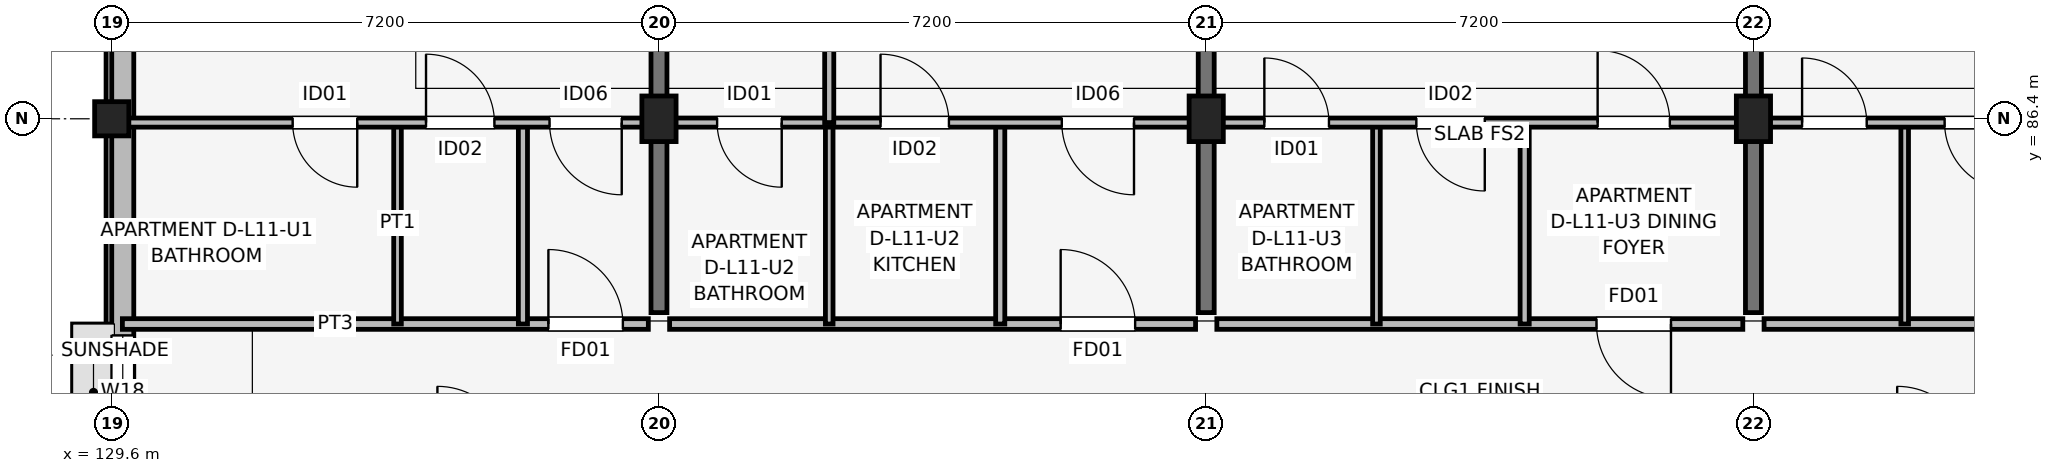
"""IFC4 building model, lengths in metres.
Left out: names, types, materials, properties, quantities, classifications, styles, units other than length and angle.
Written with IfcOpenShell. Run it as: python <this file> out.ifc"""

import sys

from ifc_helpers import new_model, si_unit, direction, frame, frame_2d, origin, origin_2d, place, context, subcontext, project, spatial, rectangle, extrude, element, fill, save


model = new_model("IFC4")
c1 = context("Model", 3, precision=1e-05, world=origin(), true_north=direction((0.0, 1.0)))
c2 = subcontext(c1, "Body", "Model", "MODEL_VIEW")
j1 = project(units=[si_unit("LENGTHUNIT", "METRE"), si_unit("PLANEANGLEUNIT", "RADIAN")], contexts=[c1])
p1 = place(None, origin())
s1 = spatial("IfcSite", under=j1, at=p1, CompositionType="ELEMENT")
p2 = place(p1, origin())
s2 = spatial("IfcBuilding", under=s1, at=p2, CompositionType="ELEMENT")
p3 = place(p2, frame((0.0, 0.0, 37.05)))
s3 = spatial("IfcBuildingStorey", under=s2, at=p3, CompositionType="ELEMENT", Elevation=37.05)
p4 = place(p3, frame((129.6, 86.4, 0.0), z_axis=(0.0, 0.0, 1.0), x_axis=(1.0, 0.0, 0.0)))
e1 = element("IfcColumn", 1, at=p4, inside=s3, PredefinedType="COLUMN", context=c2, shape_type="SweptSolid", body=[
    extrude(rectangle(XDim=0.45, YDim=0.45, at=origin_2d()), origin(), (0.0, 0.0, 1.0), 3.15),
])
for number, where, z_axis, x_axis in (
    (2, (136.8, 86.4, 0.0), (0.0, 0.0, 1.0), (1.0, 0.0, 0.0)),
    (3, (144.0, 86.4, 0.0), (0.0, 0.0, 1.0), (1.0, 0.0, 0.0)),
    (4, (151.2, 86.4, 0.0), (0.0, 0.0, 1.0), (1.0, 0.0, 0.0)),
):
    element("IfcColumn", number, at=place(p3, frame(where, z_axis=z_axis, x_axis=x_axis)), inside=s3, PredefinedType="COLUMN", context=c2, shape_type="SweptSolid", body=[
        extrude(rectangle(XDim=0.45, YDim=0.6, at=origin_2d()), origin(), (0.0, 0.0, 1.0), 3.15),
    ])
for number, where, z_axis, x_axis in (
    (5, (136.8, 83.85, 0.0), (0.0, 0.0, 1.0), (0.0, 1.0, 0.0)),
    (6, (144.0, 83.85, 0.0), (0.0, 0.0, 1.0), (0.0, 1.0, 0.0)),
    (7, (151.2, 83.85, 0.0), (0.0, 0.0, 1.0), (0.0, 1.0, 0.0)),
):
    element("IfcWall", number, at=place(p3, frame(where, z_axis=z_axis, x_axis=x_axis)), inside=s3, PredefinedType="SHEAR", context=c2, shape_type="SweptSolid", body=[
        extrude(rectangle(XDim=9.4, YDim=0.21, at=frame_2d((4.7, 0.0))), origin(), (0.0, 0.0, 1.0), 3.15),
    ])
p5 = place(p3, frame((129.745, 90.8, 0.0), z_axis=(0.0, 0.0, 1.0), x_axis=(0.0, -1.0, 0.0)))
e8 = element("IfcWall", 8, at=p5, inside=s3, PredefinedType="SOLIDWALL", context=c2, shape_type="SweptSolid", body=[
    extrude(rectangle(XDim=16.0, YDim=0.29, at=frame_2d((8.0, 0.0))), origin(), (0.0, 0.0, 1.0), 2.48),
])
p6 = place(p5, frame((7.25, 0.0, 1.05)))
e9 = element("IfcOpeningElement", 9, at=p6, cuts=e8, PredefinedType="OPENING", context=c2, shape_type="SweptSolid", body=[
    extrude(rectangle(XDim=1.5, YDim=1.15, at=frame_2d((0.75, 0.575))), frame((0.0, 0.155, 0.0), z_axis=(0.0, -1.0, 0.0), x_axis=(1.0, 0.0, 0.0)), (0.0, 0.0, 1.0), 0.31),
])
p7 = place(p5, frame((1.462, 0.0, 0.75)))
e10 = element("IfcOpeningElement", 10, at=p7, cuts=e8, PredefinedType="OPENING", context=c2, shape_type="SweptSolid", body=[
    extrude(rectangle(XDim=1.42, YDim=1.6, at=frame_2d((0.71, 0.8))), frame((0.0, 0.155, 0.0), z_axis=(0.0, -1.0, 0.0), x_axis=(1.0, 0.0, 0.0)), (0.0, 0.0, 1.0), 0.31),
])
p8 = place(p3, frame((129.74, 83.7, 0.0), z_axis=(0.0, 0.0, 1.0), x_axis=(1.0, 0.0, 0.0)))
e11 = element("IfcWall", 11, at=p8, inside=s3, PredefinedType="PARTITIONING", context=c2, shape_type="SweptSolid", body=[
    extrude(rectangle(XDim=6.92, YDim=0.14, at=frame_2d((3.46, 0.0))), origin(), (0.0, 0.0, 1.0), 2.38),
])
p9 = place(p8, frame((5.605, 0.0, 0.0)))
e12 = element("IfcOpeningElement", 12, at=p9, cuts=e11, PredefinedType="OPENING", context=c2, shape_type="SweptSolid", body=[
    extrude(rectangle(XDim=0.98, YDim=2.1, at=frame_2d((0.49, 1.05))), frame((0.0, 0.08, 0.0), z_axis=(0.0, -1.0, 0.0), x_axis=(1.0, 0.0, 0.0)), (0.0, 0.0, 1.0), 0.16),
])
p10 = place(p3, frame((133.36, 83.7, 0.0), z_axis=(0.0, 0.0, 1.0), x_axis=(0.0, 1.0, 0.0)))
e13 = element("IfcWall", 13, at=p10, inside=s3, PredefinedType="PARTITIONING", context=c2, shape_type="SweptSolid", body=[
    extrude(rectangle(XDim=2.65, YDim=0.1, at=frame_2d((1.325, 0.0))), origin(), (0.0, 0.0, 1.0), 2.38),
])
p11 = place(p3, frame((135.01, 83.7, 0.0), z_axis=(0.0, 0.0, 1.0), x_axis=(0.0, 1.0, 0.0)))
e14 = element("IfcWall", 14, at=p11, inside=s3, PredefinedType="PARTITIONING", context=c2, shape_type="SweptSolid", body=[
    extrude(rectangle(XDim=2.65, YDim=0.12, at=frame_2d((1.325, 0.0))), origin(), (0.0, 0.0, 1.0), 2.38),
])
p12 = place(p3, frame((129.74, 86.35, 0.0), z_axis=(0.0, 0.0, 1.0), x_axis=(1.0, 0.0, 0.0)))
e15 = element("IfcWall", 15, at=p12, inside=s3, PredefinedType="PARTITIONING", context=c2, shape_type="SweptSolid", body=[
    extrude(rectangle(XDim=6.92, YDim=0.12, at=frame_2d((3.46, 0.0))), origin(), (0.0, 0.0, 1.0), 2.38),
])
p13 = place(p12, frame((3.09, 0.0, 0.0), z_axis=(0.0, 0.0, 1.0), x_axis=(-1.0, 0.0, 0.0)))
e16 = element("IfcOpeningElement", 16, at=p13, cuts=e15, PredefinedType="OPENING", context=c2, shape_type="SweptSolid", body=[
    extrude(rectangle(XDim=0.85, YDim=2.08, at=frame_2d((0.425, 1.04))), frame((0.0, 0.07, 0.0), z_axis=(0.0, -1.0, 0.0), x_axis=(1.0, 0.0, 0.0)), (0.0, 0.0, 1.0), 0.14),
])
p14 = place(p12, frame((3.995, 0.0, 0.0)))
e17 = element("IfcOpeningElement", 17, at=p14, cuts=e15, PredefinedType="OPENING", context=c2, shape_type="SweptSolid", body=[
    extrude(rectangle(XDim=0.9, YDim=2.08, at=frame_2d((0.45, 1.04))), frame((0.0, 0.07, 0.0), z_axis=(0.0, -1.0, 0.0), x_axis=(1.0, 0.0, 0.0)), (0.0, 0.0, 1.0), 0.14),
])
p15 = place(p12, frame((6.57, 0.0, 0.0), z_axis=(0.0, 0.0, 1.0), x_axis=(-1.0, 0.0, 0.0)))
e18 = element("IfcOpeningElement", 18, at=p15, cuts=e15, PredefinedType="OPENING", context=c2, shape_type="SweptSolid", body=[
    extrude(rectangle(XDim=0.95, YDim=2.08, at=frame_2d((0.475, 1.04))), frame((0.0, 0.07, 0.0), z_axis=(0.0, -1.0, 0.0), x_axis=(1.0, 0.0, 0.0)), (0.0, 0.0, 1.0), 0.14),
])
p16 = place(p3, frame((136.94, 83.7, 0.0), z_axis=(0.0, 0.0, 1.0), x_axis=(1.0, 0.0, 0.0)))
e19 = element("IfcWall", 19, at=p16, inside=s3, PredefinedType="PARTITIONING", context=c2, shape_type="SweptSolid", body=[
    extrude(rectangle(XDim=6.92, YDim=0.14, at=frame_2d((3.46, 0.0))), origin(), (0.0, 0.0, 1.0), 2.38),
])
p17 = place(p16, frame((5.145, 0.0, 0.0)))
e20 = element("IfcOpeningElement", 20, at=p17, cuts=e19, PredefinedType="OPENING", context=c2, shape_type="SweptSolid", body=[
    extrude(rectangle(XDim=0.98, YDim=2.1, at=frame_2d((0.49, 1.05))), frame((0.0, 0.08, 0.0), z_axis=(0.0, -1.0, 0.0), x_axis=(1.0, 0.0, 0.0)), (0.0, 0.0, 1.0), 0.16),
])
p18 = place(p3, frame((139.04, 83.7, 0.0), z_axis=(0.0, 0.0, 1.0), x_axis=(0.0, 1.0, 0.0)))
e21 = element("IfcWall", 21, at=p18, inside=s3, PredefinedType="PARTITIONING", context=c2, shape_type="SweptSolid", body=[
    extrude(rectangle(XDim=2.65, YDim=0.1, at=frame_2d((1.325, 0.0))), origin(), (0.0, 0.0, 1.0), 2.38),
])
p19 = place(p3, frame((141.29, 83.7, 0.0), z_axis=(0.0, 0.0, 1.0), x_axis=(0.0, 1.0, 0.0)))
e22 = element("IfcWall", 22, at=p19, inside=s3, PredefinedType="PARTITIONING", context=c2, shape_type="SweptSolid", body=[
    extrude(rectangle(XDim=2.65, YDim=0.12, at=frame_2d((1.325, 0.0))), origin(), (0.0, 0.0, 1.0), 2.38),
])
p20 = place(p3, frame((136.94, 86.35, 0.0), z_axis=(0.0, 0.0, 1.0), x_axis=(1.0, 0.0, 0.0)))
e23 = element("IfcWall", 23, at=p20, inside=s3, PredefinedType="PARTITIONING", context=c2, shape_type="SweptSolid", body=[
    extrude(rectangle(XDim=6.92, YDim=0.12, at=frame_2d((3.46, 0.0))), origin(), (0.0, 0.0, 1.0), 2.38),
])
p21 = place(p20, frame((1.475, 0.0, 0.0), z_axis=(0.0, 0.0, 1.0), x_axis=(-1.0, 0.0, 0.0)))
e24 = element("IfcOpeningElement", 24, at=p21, cuts=e23, PredefinedType="OPENING", context=c2, shape_type="SweptSolid", body=[
    extrude(rectangle(XDim=0.85, YDim=2.08, at=frame_2d((0.425, 1.04))), frame((0.0, 0.07, 0.0), z_axis=(0.0, -1.0, 0.0), x_axis=(1.0, 0.0, 0.0)), (0.0, 0.0, 1.0), 0.14),
])
p22 = place(p20, frame((2.775, 0.0, 0.0)))
e25 = element("IfcOpeningElement", 25, at=p22, cuts=e23, PredefinedType="OPENING", context=c2, shape_type="SweptSolid", body=[
    extrude(rectangle(XDim=0.9, YDim=2.08, at=frame_2d((0.45, 1.04))), frame((0.0, 0.07, 0.0), z_axis=(0.0, -1.0, 0.0), x_axis=(1.0, 0.0, 0.0)), (0.0, 0.0, 1.0), 0.14),
])
p23 = place(p20, frame((6.11, 0.0, 0.0), z_axis=(0.0, 0.0, 1.0), x_axis=(-1.0, 0.0, 0.0)))
e26 = element("IfcOpeningElement", 26, at=p23, cuts=e23, PredefinedType="OPENING", context=c2, shape_type="SweptSolid", body=[
    extrude(rectangle(XDim=0.95, YDim=2.08, at=frame_2d((0.475, 1.04))), frame((0.0, 0.07, 0.0), z_axis=(0.0, -1.0, 0.0), x_axis=(1.0, 0.0, 0.0)), (0.0, 0.0, 1.0), 0.14),
])
p24 = place(p3, frame((139.04, 86.35, 0.0), z_axis=(0.0, 0.0, 1.0), x_axis=(0.0, 1.0, 0.0)))
e27 = element("IfcWall", 27, at=p24, inside=s3, PredefinedType="PARTITIONING", context=c2, shape_type="SweptSolid", body=[
    extrude(rectangle(XDim=6.95, YDim=0.12, at=frame_2d((3.475, 0.0))), origin(), (0.0, 0.0, 1.0), 2.38),
])
p25 = place(p24, frame((3.025, 0.0, 0.0)))
e28 = element("IfcOpeningElement", 28, at=p25, cuts=e27, PredefinedType="OPENING", context=c2, shape_type="SweptSolid", body=[
    extrude(rectangle(XDim=0.9, YDim=2.08, at=frame_2d((0.45, 1.04))), frame((0.0, 0.07, 0.0), z_axis=(0.0, -1.0, 0.0), x_axis=(1.0, 0.0, 0.0)), (0.0, 0.0, 1.0), 0.14),
])
p26 = place(p3, frame((144.14, 83.7, 0.0), z_axis=(0.0, 0.0, 1.0), x_axis=(1.0, 0.0, 0.0)))
e29 = element("IfcWall", 29, at=p26, inside=s3, PredefinedType="PARTITIONING", context=c2, shape_type="SweptSolid", body=[
    extrude(rectangle(XDim=6.92, YDim=0.14, at=frame_2d((3.46, 0.0))), origin(), (0.0, 0.0, 1.0), 2.38),
])
p27 = place(p26, frame((5.975, 0.0, 0.0), z_axis=(0.0, 0.0, 1.0), x_axis=(-1.0, 0.0, 0.0)))
e30 = element("IfcOpeningElement", 30, at=p27, cuts=e29, PredefinedType="OPENING", context=c2, shape_type="SweptSolid", body=[
    extrude(rectangle(XDim=0.98, YDim=2.1, at=frame_2d((0.49, 1.05))), frame((0.0, 0.08, 0.0), z_axis=(0.0, -1.0, 0.0), x_axis=(1.0, 0.0, 0.0)), (0.0, 0.0, 1.0), 0.16),
])
p28 = place(p3, frame((146.24, 83.7, 0.0), z_axis=(0.0, 0.0, 1.0), x_axis=(0.0, 1.0, 0.0)))
e31 = element("IfcWall", 31, at=p28, inside=s3, PredefinedType="PARTITIONING", context=c2, shape_type="SweptSolid", body=[
    extrude(rectangle(XDim=2.65, YDim=0.1, at=frame_2d((1.325, 0.0))), origin(), (0.0, 0.0, 1.0), 2.38),
])
p29 = place(p3, frame((148.19, 83.7, 0.0), z_axis=(0.0, 0.0, 1.0), x_axis=(0.0, 1.0, 0.0)))
e32 = element("IfcWall", 32, at=p29, inside=s3, PredefinedType="PARTITIONING", context=c2, shape_type="SweptSolid", body=[
    extrude(rectangle(XDim=2.65, YDim=0.12, at=frame_2d((1.325, 0.0))), origin(), (0.0, 0.0, 1.0), 2.38),
])
p30 = place(p3, frame((144.14, 86.35, 0.0), z_axis=(0.0, 0.0, 1.0), x_axis=(1.0, 0.0, 0.0)))
e33 = element("IfcWall", 33, at=p30, inside=s3, PredefinedType="PARTITIONING", context=c2, shape_type="SweptSolid", body=[
    extrude(rectangle(XDim=6.92, YDim=0.12, at=frame_2d((3.46, 0.0))), origin(), (0.0, 0.0, 1.0), 2.38),
])
p31 = place(p30, frame((0.625, 0.0, 0.0)))
e34 = element("IfcOpeningElement", 34, at=p31, cuts=e33, PredefinedType="OPENING", context=c2, shape_type="SweptSolid", body=[
    extrude(rectangle(XDim=0.85, YDim=2.08, at=frame_2d((0.425, 1.04))), frame((0.0, 0.07, 0.0), z_axis=(0.0, -1.0, 0.0), x_axis=(1.0, 0.0, 0.0)), (0.0, 0.0, 1.0), 0.14),
])
p32 = place(p30, frame((3.525, 0.0, 0.0), z_axis=(0.0, 0.0, 1.0), x_axis=(-1.0, 0.0, 0.0)))
e35 = element("IfcOpeningElement", 35, at=p32, cuts=e33, PredefinedType="OPENING", context=c2, shape_type="SweptSolid", body=[
    extrude(rectangle(XDim=0.9, YDim=2.08, at=frame_2d((0.45, 1.04))), frame((0.0, 0.07, 0.0), z_axis=(0.0, -1.0, 0.0), x_axis=(1.0, 0.0, 0.0)), (0.0, 0.0, 1.0), 0.14),
])
p33 = place(p30, frame((5.01, 0.0, 0.0)))
e36 = element("IfcOpeningElement", 36, at=p33, cuts=e33, PredefinedType="OPENING", context=c2, shape_type="SweptSolid", body=[
    extrude(rectangle(XDim=0.95, YDim=2.08, at=frame_2d((0.475, 1.04))), frame((0.0, 0.07, 0.0), z_axis=(0.0, -1.0, 0.0), x_axis=(1.0, 0.0, 0.0)), (0.0, 0.0, 1.0), 0.14),
])
p34 = place(p3, frame((151.34, 83.7, 0.0), z_axis=(0.0, 0.0, 1.0), x_axis=(1.0, 0.0, 0.0)))
e37 = element("IfcWall", 37, at=p34, inside=s3, PredefinedType="PARTITIONING", context=c2, shape_type="SweptSolid", body=[
    extrude(rectangle(XDim=6.92, YDim=0.14, at=frame_2d((3.46, 0.0))), origin(), (0.0, 0.0, 1.0), 2.38),
])
p35 = place(p34, frame((5.85, 0.0, 0.0), z_axis=(0.0, 0.0, 1.0), x_axis=(-1.0, 0.0, 0.0)))
e38 = element("IfcOpeningElement", 38, at=p35, cuts=e37, PredefinedType="OPENING", context=c2, shape_type="SweptSolid", body=[
    extrude(rectangle(XDim=0.98, YDim=2.1, at=frame_2d((0.49, 1.05))), frame((0.0, 0.08, 0.0), z_axis=(0.0, -1.0, 0.0), x_axis=(1.0, 0.0, 0.0)), (0.0, 0.0, 1.0), 0.16),
])
p36 = place(p3, frame((153.19, 83.7, 0.0), z_axis=(0.0, 0.0, 1.0), x_axis=(0.0, 1.0, 0.0)))
e39 = element("IfcWall", 39, at=p36, inside=s3, PredefinedType="PARTITIONING", context=c2, shape_type="SweptSolid", body=[
    extrude(rectangle(XDim=2.65, YDim=0.1, at=frame_2d((1.325, 0.0))), origin(), (0.0, 0.0, 1.0), 2.38),
])
p37 = place(p3, frame((151.34, 86.35, 0.0), z_axis=(0.0, 0.0, 1.0), x_axis=(1.0, 0.0, 0.0)))
e40 = element("IfcWall", 40, at=p37, inside=s3, PredefinedType="PARTITIONING", context=c2, shape_type="SweptSolid", body=[
    extrude(rectangle(XDim=6.92, YDim=0.12, at=frame_2d((3.46, 0.0))), origin(), (0.0, 0.0, 1.0), 2.38),
])
p38 = place(p37, frame((0.5, 0.0, 0.0)))
e41 = element("IfcOpeningElement", 41, at=p38, cuts=e40, PredefinedType="OPENING", context=c2, shape_type="SweptSolid", body=[
    extrude(rectangle(XDim=0.85, YDim=2.08, at=frame_2d((0.425, 1.04))), frame((0.0, 0.07, 0.0), z_axis=(0.0, -1.0, 0.0), x_axis=(1.0, 0.0, 0.0)), (0.0, 0.0, 1.0), 0.14),
])
p39 = place(p37, frame((3.275, 0.0, 0.0), z_axis=(0.0, 0.0, 1.0), x_axis=(-1.0, 0.0, 0.0)))
e42 = element("IfcOpeningElement", 42, at=p39, cuts=e40, PredefinedType="OPENING", context=c2, shape_type="SweptSolid", body=[
    extrude(rectangle(XDim=0.9, YDim=2.08, at=frame_2d((0.45, 1.04))), frame((0.0, 0.07, 0.0), z_axis=(0.0, -1.0, 0.0), x_axis=(1.0, 0.0, 0.0)), (0.0, 0.0, 1.0), 0.14),
])
p40 = place(p37, frame((4.885, 0.0, 0.0)))
e43 = element("IfcOpeningElement", 43, at=p40, cuts=e40, PredefinedType="OPENING", context=c2, shape_type="SweptSolid", body=[
    extrude(rectangle(XDim=0.95, YDim=2.08, at=frame_2d((0.475, 1.04))), frame((0.0, 0.07, 0.0), z_axis=(0.0, -1.0, 0.0), x_axis=(1.0, 0.0, 0.0)), (0.0, 0.0, 1.0), 0.14),
])
p41 = place(p6, origin())
e44 = element("IfcWindow", 44, at=p41, inside=s3, PartitioningType="SINGLE_PANEL", PredefinedType="WINDOW", context=c2, shape_type="SweptSolid", body=[
    extrude(rectangle(XDim=1.5, YDim=1.15, at=frame_2d((0.75, 0.575))), frame((0.0, 0.03, 0.0), z_axis=(0.0, -1.0, 0.0), x_axis=(1.0, 0.0, 0.0)), (0.0, 0.0, 1.0), 0.06),
])
fill(e9, e44)
p42 = place(p9, origin())
e45 = element("IfcDoor", 45, at=p42, inside=s3, OperationType="SINGLE_SWING_LEFT", PredefinedType="DOOR", context=c2, shape_type="SweptSolid", body=[
    extrude(rectangle(XDim=0.98, YDim=2.1, at=frame_2d((0.49, 1.05))), frame((0.0, 0.025, 0.0), z_axis=(0.0, -1.0, 0.0), x_axis=(1.0, 0.0, 0.0)), (0.0, 0.0, 1.0), 0.05),
])
fill(e12, e45)
p43 = place(p13, origin())
e46 = element("IfcDoor", 46, at=p43, inside=s3, OperationType="SINGLE_SWING_RIGHT", PredefinedType="DOOR", context=c2, shape_type="SweptSolid", body=[
    extrude(rectangle(XDim=0.85, YDim=2.08, at=frame_2d((0.425, 1.04))), frame((0.0, 0.025, 0.0), z_axis=(0.0, -1.0, 0.0), x_axis=(1.0, 0.0, 0.0)), (0.0, 0.0, 1.0), 0.05),
])
fill(e16, e46)
p44 = place(p14, origin())
e47 = element("IfcDoor", 47, at=p44, inside=s3, OperationType="SINGLE_SWING_LEFT", PredefinedType="DOOR", context=c2, shape_type="SweptSolid", body=[
    extrude(rectangle(XDim=0.9, YDim=2.08, at=frame_2d((0.45, 1.04))), frame((0.0, 0.025, 0.0), z_axis=(0.0, -1.0, 0.0), x_axis=(1.0, 0.0, 0.0)), (0.0, 0.0, 1.0), 0.05),
])
fill(e17, e47)
p45 = place(p15, origin())
e48 = element("IfcDoor", 48, at=p45, inside=s3, OperationType="SINGLE_SWING_RIGHT", PredefinedType="DOOR", context=c2, shape_type="SweptSolid", body=[
    extrude(rectangle(XDim=0.95, YDim=2.08, at=frame_2d((0.475, 1.04))), frame((0.0, 0.025, 0.0), z_axis=(0.0, -1.0, 0.0), x_axis=(1.0, 0.0, 0.0)), (0.0, 0.0, 1.0), 0.05),
])
fill(e18, e48)
p46 = place(p17, origin())
e49 = element("IfcDoor", 49, at=p46, inside=s3, OperationType="SINGLE_SWING_LEFT", PredefinedType="DOOR", context=c2, shape_type="SweptSolid", body=[
    extrude(rectangle(XDim=0.98, YDim=2.1, at=frame_2d((0.49, 1.05))), frame((0.0, 0.025, 0.0), z_axis=(0.0, -1.0, 0.0), x_axis=(1.0, 0.0, 0.0)), (0.0, 0.0, 1.0), 0.05),
])
fill(e20, e49)
p47 = place(p21, origin())
e50 = element("IfcDoor", 50, at=p47, inside=s3, OperationType="SINGLE_SWING_RIGHT", PredefinedType="DOOR", context=c2, shape_type="SweptSolid", body=[
    extrude(rectangle(XDim=0.85, YDim=2.08, at=frame_2d((0.425, 1.04))), frame((0.0, 0.025, 0.0), z_axis=(0.0, -1.0, 0.0), x_axis=(1.0, 0.0, 0.0)), (0.0, 0.0, 1.0), 0.05),
])
fill(e24, e50)
p48 = place(p22, origin())
e51 = element("IfcDoor", 51, at=p48, inside=s3, OperationType="SINGLE_SWING_LEFT", PredefinedType="DOOR", context=c2, shape_type="SweptSolid", body=[
    extrude(rectangle(XDim=0.9, YDim=2.08, at=frame_2d((0.45, 1.04))), frame((0.0, 0.025, 0.0), z_axis=(0.0, -1.0, 0.0), x_axis=(1.0, 0.0, 0.0)), (0.0, 0.0, 1.0), 0.05),
])
fill(e25, e51)
p49 = place(p23, origin())
e52 = element("IfcDoor", 52, at=p49, inside=s3, OperationType="SINGLE_SWING_RIGHT", PredefinedType="DOOR", context=c2, shape_type="SweptSolid", body=[
    extrude(rectangle(XDim=0.95, YDim=2.08, at=frame_2d((0.475, 1.04))), frame((0.0, 0.025, 0.0), z_axis=(0.0, -1.0, 0.0), x_axis=(1.0, 0.0, 0.0)), (0.0, 0.0, 1.0), 0.05),
])
fill(e26, e52)
p50 = place(p27, origin())
e53 = element("IfcDoor", 53, at=p50, inside=s3, OperationType="SINGLE_SWING_RIGHT", PredefinedType="DOOR", context=c2, shape_type="SweptSolid", body=[
    extrude(rectangle(XDim=0.98, YDim=2.1, at=frame_2d((0.49, 1.05))), frame((0.0, 0.025, 0.0), z_axis=(0.0, -1.0, 0.0), x_axis=(1.0, 0.0, 0.0)), (0.0, 0.0, 1.0), 0.05),
])
fill(e30, e53)
p51 = place(p31, origin())
e54 = element("IfcDoor", 54, at=p51, inside=s3, OperationType="SINGLE_SWING_LEFT", PredefinedType="DOOR", context=c2, shape_type="SweptSolid", body=[
    extrude(rectangle(XDim=0.85, YDim=2.08, at=frame_2d((0.425, 1.04))), frame((0.0, 0.025, 0.0), z_axis=(0.0, -1.0, 0.0), x_axis=(1.0, 0.0, 0.0)), (0.0, 0.0, 1.0), 0.05),
])
fill(e34, e54)
p52 = place(p32, origin())
e55 = element("IfcDoor", 55, at=p52, inside=s3, OperationType="SINGLE_SWING_RIGHT", PredefinedType="DOOR", context=c2, shape_type="SweptSolid", body=[
    extrude(rectangle(XDim=0.9, YDim=2.08, at=frame_2d((0.45, 1.04))), frame((0.0, 0.025, 0.0), z_axis=(0.0, -1.0, 0.0), x_axis=(1.0, 0.0, 0.0)), (0.0, 0.0, 1.0), 0.05),
])
fill(e35, e55)
p53 = place(p33, origin())
e56 = element("IfcDoor", 56, at=p53, inside=s3, OperationType="SINGLE_SWING_LEFT", PredefinedType="DOOR", context=c2, shape_type="SweptSolid", body=[
    extrude(rectangle(XDim=0.95, YDim=2.08, at=frame_2d((0.475, 1.04))), frame((0.0, 0.025, 0.0), z_axis=(0.0, -1.0, 0.0), x_axis=(1.0, 0.0, 0.0)), (0.0, 0.0, 1.0), 0.05),
])
fill(e36, e56)
p54 = place(p38, origin())
e57 = element("IfcDoor", 57, at=p54, inside=s3, OperationType="SINGLE_SWING_LEFT", PredefinedType="DOOR", context=c2, shape_type="SweptSolid", body=[
    extrude(rectangle(XDim=0.85, YDim=2.08, at=frame_2d((0.425, 1.04))), frame((0.0, 0.025, 0.0), z_axis=(0.0, -1.0, 0.0), x_axis=(1.0, 0.0, 0.0)), (0.0, 0.0, 1.0), 0.05),
])
fill(e41, e57)
p55 = place(p39, origin())
e58 = element("IfcDoor", 58, at=p55, inside=s3, OperationType="SINGLE_SWING_RIGHT", PredefinedType="DOOR", context=c2, shape_type="SweptSolid", body=[
    extrude(rectangle(XDim=0.9, YDim=2.08, at=frame_2d((0.45, 1.04))), frame((0.0, 0.025, 0.0), z_axis=(0.0, -1.0, 0.0), x_axis=(1.0, 0.0, 0.0)), (0.0, 0.0, 1.0), 0.05),
])
fill(e42, e58)
save(model, sys.argv[1])
